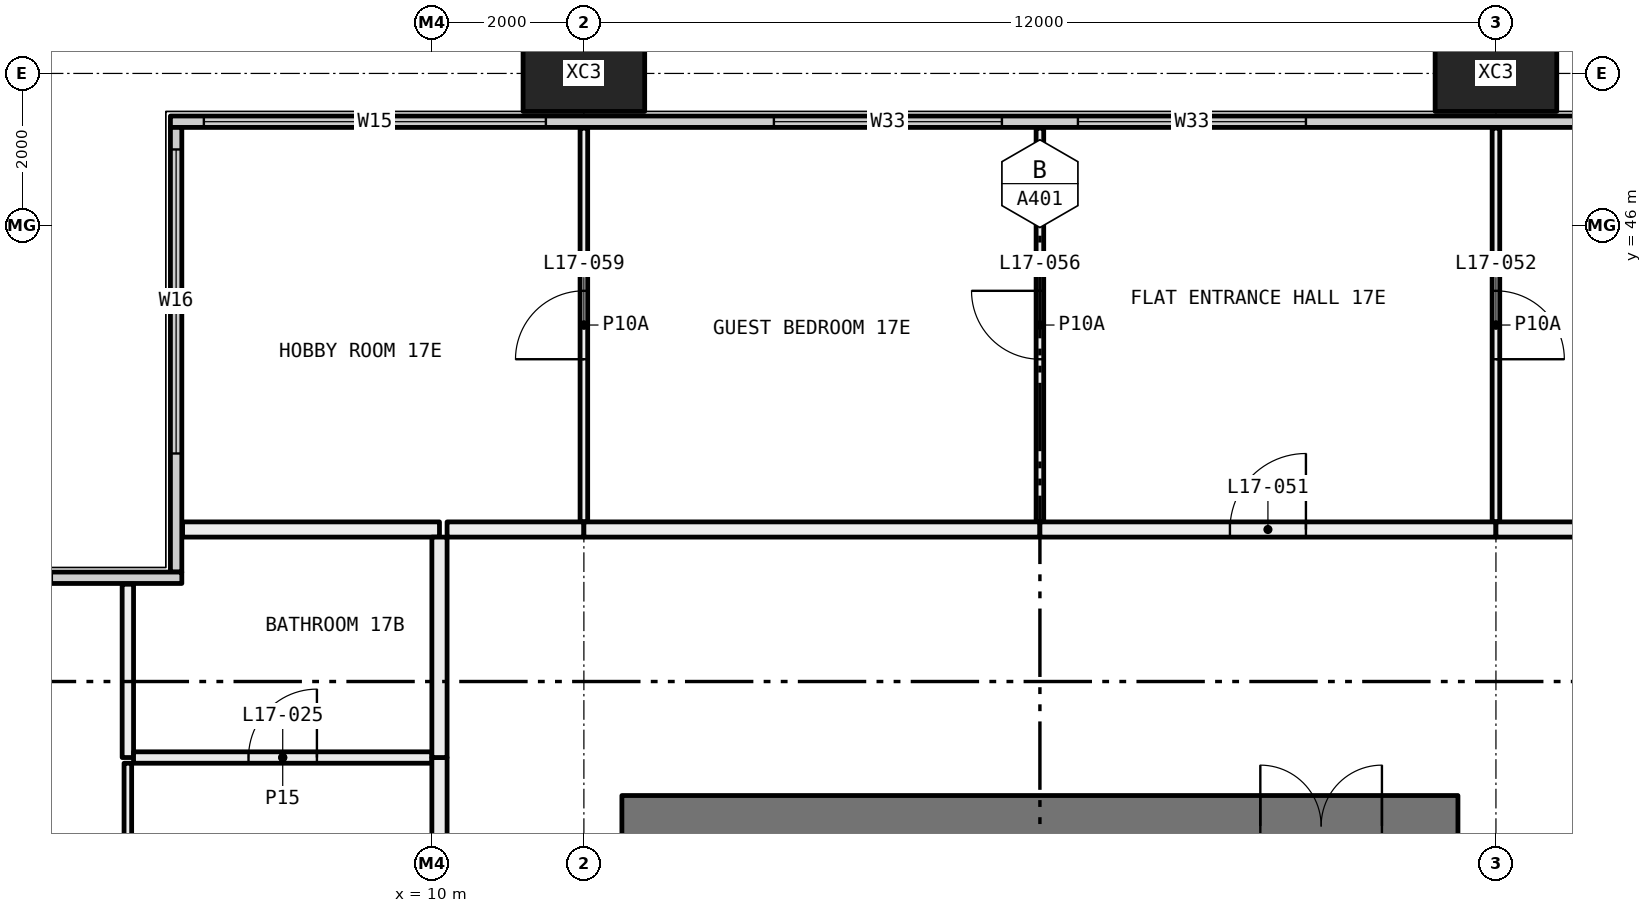
"""IFC4 building model, lengths in metres.
Left out: names, types, materials, properties, quantities, classifications, styles, units other than length and angle.
Written with IfcOpenShell. Run it as: python <this file> out.ifc"""

import sys

from ifc_helpers import new_model, si_unit, direction, frame, frame_2d, origin, origin_2d, place, context, subcontext, project, spatial, rectangle, hollow_rectangle, extrude, element, fill, save


model = new_model("IFC4")
c1 = context("Model", 3, precision=1e-05, world=origin(), true_north=direction((0.0, 1.0)))
c2 = subcontext(c1, "Body", "Model", "MODEL_VIEW")
j1 = project(units=[si_unit("LENGTHUNIT", "METRE"), si_unit("PLANEANGLEUNIT", "RADIAN")], contexts=[c1])
p1 = place(None, origin())
s1 = spatial("IfcSite", under=j1, at=p1, CompositionType="ELEMENT")
p2 = place(p1, origin())
s2 = spatial("IfcBuilding", under=s1, at=p2, CompositionType="ELEMENT")
p3 = place(p2, frame((0.0, 0.0, 71.4)))
s3 = spatial("IfcBuildingStorey", under=s2, at=p3, CompositionType="ELEMENT", Elevation=71.4)
for number, where, z_axis, x_axis in (
    (1, (12.0, 48.0, -0.4), (0.0, 0.0, 1.0), (1.0, 0.0, 0.0)),
    (2, (24.0, 48.0, -0.4), (0.0, 0.0, 1.0), (1.0, 0.0, 0.0)),
):
    element("IfcColumn", number, at=place(p3, frame(where, z_axis=z_axis, x_axis=x_axis)), inside=s3, PredefinedType="COLUMN", context=c2, shape_type="SweptSolid", body=[
        extrude(hollow_rectangle(XDim=1.6, YDim=1.0, WallThickness=0.065, at=origin_2d()), origin(), (0.0, 0.0, 1.0), 3.45),
    ])
p4 = place(p3, frame((6.56, 47.365, 0.0), z_axis=(0.0, 0.0, 1.0), x_axis=(1.0, 0.0, 0.0)))
e3 = element("IfcWall", 3, at=p4, inside=s3, PredefinedType="ELEMENTEDWALL", context=c2, shape_type="SweptSolid", body=[
    extrude(rectangle(XDim=58.88, YDim=0.15, at=frame_2d((29.44, 0.0))), origin(), (0.0, 0.0, 1.0), 3.05),
])
p5 = place(p4, frame((0.44, 0.0, 0.45)))
e4 = element("IfcOpeningElement", 4, at=p5, cuts=e3, PredefinedType="OPENING", context=c2, shape_type="SweptSolid", body=[
    extrude(rectangle(XDim=4.5, YDim=2.55, at=frame_2d((2.25, 1.275))), frame((0.0, 0.085, 0.0), z_axis=(0.0, -1.0, 0.0), x_axis=(1.0, 0.0, 0.0)), (0.0, 0.0, 1.0), 0.17),
])
p6 = place(p4, frame((7.94, 0.0, 0.45)))
e5 = element("IfcOpeningElement", 5, at=p6, cuts=e3, PredefinedType="OPENING", context=c2, shape_type="SweptSolid", body=[
    extrude(rectangle(XDim=3.0, YDim=2.55, at=frame_2d((1.5, 1.275))), frame((0.0, 0.085, 0.0), z_axis=(0.0, -1.0, 0.0), x_axis=(1.0, 0.0, 0.0)), (0.0, 0.0, 1.0), 0.17),
])
p7 = place(p4, frame((11.94, 0.0, 0.45)))
e6 = element("IfcOpeningElement", 6, at=p7, cuts=e3, PredefinedType="OPENING", context=c2, shape_type="SweptSolid", body=[
    extrude(rectangle(XDim=3.0, YDim=2.55, at=frame_2d((1.5, 1.275))), frame((0.0, 0.085, 0.0), z_axis=(0.0, -1.0, 0.0), x_axis=(1.0, 0.0, 0.0)), (0.0, 0.0, 1.0), 0.17),
])
p8 = place(p4, frame((19.94, 0.0, 0.45)))
e7 = element("IfcOpeningElement", 7, at=p8, cuts=e3, PredefinedType="OPENING", context=c2, shape_type="SweptSolid", body=[
    extrude(rectangle(XDim=3.0, YDim=2.55, at=frame_2d((1.5, 1.275))), frame((0.0, 0.085, 0.0), z_axis=(0.0, -1.0, 0.0), x_axis=(1.0, 0.0, 0.0)), (0.0, 0.0, 1.0), 0.17),
])
p9 = place(p4, frame((23.94, 0.0, 0.45)))
e8 = element("IfcOpeningElement", 8, at=p9, cuts=e3, PredefinedType="OPENING", context=c2, shape_type="SweptSolid", body=[
    extrude(rectangle(XDim=2.0, YDim=2.55, at=frame_2d((1.0, 1.275))), frame((0.0, 0.085, 0.0), z_axis=(0.0, -1.0, 0.0), x_axis=(1.0, 0.0, 0.0)), (0.0, 0.0, 1.0), 0.17),
])
p10 = place(p4, frame((31.94, 0.0, 0.45)))
e9 = element("IfcOpeningElement", 9, at=p10, cuts=e3, PredefinedType="OPENING", context=c2, shape_type="SweptSolid", body=[
    extrude(rectangle(XDim=3.0, YDim=2.55, at=frame_2d((1.5, 1.275))), frame((0.0, 0.085, 0.0), z_axis=(0.0, -1.0, 0.0), x_axis=(1.0, 0.0, 0.0)), (0.0, 0.0, 1.0), 0.17),
])
p11 = place(p4, frame((35.94, 0.0, 0.45)))
e10 = element("IfcOpeningElement", 10, at=p11, cuts=e3, PredefinedType="OPENING", context=c2, shape_type="SweptSolid", body=[
    extrude(rectangle(XDim=3.0, YDim=2.55, at=frame_2d((1.5, 1.275))), frame((0.0, 0.085, 0.0), z_axis=(0.0, -1.0, 0.0), x_axis=(1.0, 0.0, 0.0)), (0.0, 0.0, 1.0), 0.17),
])
p12 = place(p4, frame((43.94, 0.0, 0.45)))
e11 = element("IfcOpeningElement", 11, at=p12, cuts=e3, PredefinedType="OPENING", context=c2, shape_type="SweptSolid", body=[
    extrude(rectangle(XDim=3.0, YDim=2.55, at=frame_2d((1.5, 1.275))), frame((0.0, 0.085, 0.0), z_axis=(0.0, -1.0, 0.0), x_axis=(1.0, 0.0, 0.0)), (0.0, 0.0, 1.0), 0.17),
])
p13 = place(p4, frame((47.94, 0.0, 0.45)))
e12 = element("IfcOpeningElement", 12, at=p13, cuts=e3, PredefinedType="OPENING", context=c2, shape_type="SweptSolid", body=[
    extrude(rectangle(XDim=2.0, YDim=2.55, at=frame_2d((1.0, 1.275))), frame((0.0, 0.085, 0.0), z_axis=(0.0, -1.0, 0.0), x_axis=(1.0, 0.0, 0.0)), (0.0, 0.0, 1.0), 0.17),
])
p14 = place(p4, frame((53.94, 0.0, 0.45)))
e13 = element("IfcOpeningElement", 13, at=p14, cuts=e3, PredefinedType="OPENING", context=c2, shape_type="SweptSolid", body=[
    extrude(rectangle(XDim=4.5, YDim=2.55, at=frame_2d((2.25, 1.275))), frame((0.0, 0.085, 0.0), z_axis=(0.0, -1.0, 0.0), x_axis=(1.0, 0.0, 0.0)), (0.0, 0.0, 1.0), 0.17),
])
p15 = place(p3, frame((6.635, 41.44, 0.0), z_axis=(0.0, 0.0, 1.0), x_axis=(0.0, 1.0, 0.0)))
e14 = element("IfcWall", 14, at=p15, inside=s3, PredefinedType="ELEMENTEDWALL", context=c2, shape_type="SweptSolid", body=[
    extrude(rectangle(XDim=5.85, YDim=0.15, at=frame_2d((2.925, 0.0))), origin(), (0.0, 0.0, 1.0), 3.05),
])
p16 = place(p15, frame((1.56, 0.0, 0.45)))
e15 = element("IfcOpeningElement", 15, at=p16, cuts=e14, PredefinedType="OPENING", context=c2, shape_type="SweptSolid", body=[
    extrude(rectangle(XDim=4.0, YDim=2.55, at=frame_2d((2.0, 1.275))), frame((0.0, 0.085, 0.0), z_axis=(0.0, -1.0, 0.0), x_axis=(1.0, 0.0, 0.0)), (0.0, 0.0, 1.0), 0.17),
])
p17 = place(p3, frame((0.56, 41.365, 0.0), z_axis=(0.0, 0.0, 1.0), x_axis=(1.0, 0.0, 0.0)))
e16 = element("IfcWall", 16, at=p17, inside=s3, PredefinedType="ELEMENTEDWALL", context=c2, shape_type="SweptSolid", body=[
    extrude(rectangle(XDim=6.15, YDim=0.15, at=frame_2d((3.075, 0.0))), origin(), (0.0, 0.0, 1.0), 3.05),
])
p18 = place(p17, frame((0.44, 0.0, 0.45)))
e17 = element("IfcOpeningElement", 17, at=p18, cuts=e16, PredefinedType="OPENING", context=c2, shape_type="SweptSolid", body=[
    extrude(rectangle(XDim=4.0, YDim=2.55, at=frame_2d((2.0, 1.275))), frame((0.0, 0.085, 0.0), z_axis=(0.0, -1.0, 0.0), x_axis=(1.0, 0.0, 0.0)), (0.0, 0.0, 1.0), 0.17),
])
p19 = place(p3, frame((6.0, 36.05, 0.0), z_axis=(0.0, 0.0, 1.0), x_axis=(0.0, 1.0, 0.0)))
e18 = element("IfcWall", 18, at=p19, inside=s3, PredefinedType="PARTITIONING", context=c2, shape_type="SweptSolid", body=[
    extrude(rectangle(XDim=2.875, YDim=0.1, at=frame_2d((1.438, 0.0))), origin(), (0.0, 0.0, 1.0), 2.45),
])
p20 = place(p3, frame((6.0, 39.0, 0.0), z_axis=(0.0, 0.0, 1.0), x_axis=(0.0, 1.0, 0.0)))
e19 = element("IfcWall", 19, at=p20, inside=s3, PredefinedType="PARTITIONING", context=c2, shape_type="SweptSolid", body=[
    extrude(rectangle(XDim=2.28, YDim=0.15, at=frame_2d((1.14, 0.0))), origin(), (0.0, 0.0, 1.0), 3.05),
])
p21 = place(p3, frame((10.0, 39.0, 0.0), z_axis=(0.0, 0.0, 1.0), x_axis=(-1.0, 0.0, 0.0)))
e20 = element("IfcWall", 20, at=p21, inside=s3, PredefinedType="PARTITIONING", context=c2, shape_type="SweptSolid", body=[
    extrude(rectangle(XDim=3.925, YDim=0.15, at=frame_2d((1.962, 0.0))), origin(), (0.0, 0.0, 1.0), 3.05),
])
p22 = place(p21, frame((1.512, 0.0, 0.0)))
e21 = element("IfcOpeningElement", 21, at=p22, cuts=e20, PredefinedType="OPENING", context=c2, shape_type="SweptSolid", body=[
    extrude(rectangle(XDim=0.9, YDim=2.1, at=frame_2d((0.45, 1.05))), frame((0.0, 0.085, 0.0), z_axis=(0.0, -1.0, 0.0), x_axis=(1.0, 0.0, 0.0)), (0.0, 0.0, 1.0), 0.17),
])
p23 = place(p3, frame((10.1, 36.1, 0.0), z_axis=(0.0, 0.0, 1.0), x_axis=(0.0, 1.0, 0.0)))
e22 = element("IfcWall", 22, at=p23, inside=s3, PredefinedType="PARTITIONING", context=c2, shape_type="SweptSolid", body=[
    extrude(rectangle(XDim=2.9, YDim=0.2, at=frame_2d((1.45, 0.0))), origin(), (0.0, 0.0, 1.0), 3.05),
])
p24 = place(p3, frame((10.1, 42.0, 0.0), z_axis=(0.0, 0.0, 1.0), x_axis=(-1.0, 0.0, 0.0)))
e23 = element("IfcWall", 23, at=p24, inside=s3, PredefinedType="PARTITIONING", context=c2, shape_type="SweptSolid", body=[
    extrude(rectangle(XDim=3.38, YDim=0.2, at=frame_2d((1.69, 0.0))), origin(), (0.0, 0.0, 1.0), 3.05),
])
p25 = place(p3, frame((10.1, 39.0, 0.0), z_axis=(0.0, 0.0, 1.0), x_axis=(0.0, 1.0, 0.0)))
e24 = element("IfcWall", 24, at=p25, inside=s3, PredefinedType="PARTITIONING", context=c2, shape_type="SweptSolid", body=[
    extrude(rectangle(XDim=2.9, YDim=0.2, at=frame_2d((1.45, 0.0))), origin(), (0.0, 0.0, 1.0), 3.05),
])
p26 = place(p3, frame((12.0, 42.1, 0.0), z_axis=(0.0, 0.0, 1.0), x_axis=(0.0, 1.0, 0.0)))
e25 = element("IfcWall", 25, at=p26, inside=s3, PredefinedType="PARTITIONING", context=c2, shape_type="SweptSolid", body=[
    extrude(rectangle(XDim=5.18, YDim=0.1, at=frame_2d((2.59, 0.0))), origin(), (0.0, 0.0, 1.0), 3.05),
])
p27 = place(p26, frame((2.14, 0.0, 0.0)))
e26 = element("IfcOpeningElement", 26, at=p27, cuts=e25, PredefinedType="OPENING", context=c2, shape_type="SweptSolid", body=[
    extrude(rectangle(XDim=0.9, YDim=2.1, at=frame_2d((0.45, 1.05))), frame((0.0, 0.06, 0.0), z_axis=(0.0, -1.0, 0.0), x_axis=(1.0, 0.0, 0.0)), (0.0, 0.0, 1.0), 0.12),
])
p28 = place(p3, frame((10.2, 42.0, 0.0), z_axis=(0.0, 0.0, 1.0), x_axis=(1.0, 0.0, 0.0)))
e27 = element("IfcWall", 27, at=p28, inside=s3, PredefinedType="PARTITIONING", context=c2, shape_type="SweptSolid", body=[
    extrude(rectangle(XDim=1.8, YDim=0.2, at=frame_2d((0.9, 0.0))), origin(), (0.0, 0.0, 1.0), 3.05),
])
p29 = place(p3, frame((18.0, 42.1, 0.0), z_axis=(0.0, 0.0, 1.0), x_axis=(0.0, 1.0, 0.0)))
e28 = element("IfcWall", 28, at=p29, inside=s3, PredefinedType="PARTITIONING", context=c2, shape_type="SweptSolid", body=[
    extrude(rectangle(XDim=5.18, YDim=0.1, at=frame_2d((2.59, 0.0))), origin(), (0.0, 0.0, 1.0), 3.05),
])
p30 = place(p29, frame((2.14, 0.0, 0.0)))
e29 = element("IfcOpeningElement", 29, at=p30, cuts=e28, PredefinedType="OPENING", context=c2, shape_type="SweptSolid", body=[
    extrude(rectangle(XDim=0.9, YDim=2.1, at=frame_2d((0.45, 1.05))), frame((0.0, 0.06, 0.0), z_axis=(0.0, -1.0, 0.0), x_axis=(1.0, 0.0, 0.0)), (0.0, 0.0, 1.0), 0.12),
])
p31 = place(p3, frame((12.0, 42.0, 0.0), z_axis=(0.0, 0.0, 1.0), x_axis=(1.0, 0.0, 0.0)))
e30 = element("IfcWall", 30, at=p31, inside=s3, PredefinedType="PARTITIONING", context=c2, shape_type="SweptSolid", body=[
    extrude(rectangle(XDim=6.0, YDim=0.2, at=frame_2d((3.0, 0.0))), origin(), (0.0, 0.0, 1.0), 3.05),
])
p32 = place(p3, frame((24.0, 42.1, 0.0), z_axis=(0.0, 0.0, 1.0), x_axis=(0.0, 1.0, 0.0)))
e31 = element("IfcWall", 31, at=p32, inside=s3, PredefinedType="PARTITIONING", context=c2, shape_type="SweptSolid", body=[
    extrude(rectangle(XDim=5.18, YDim=0.1, at=frame_2d((2.59, 0.0))), origin(), (0.0, 0.0, 1.0), 3.05),
])
p33 = place(p32, frame((2.14, 0.0, 0.0)))
e32 = element("IfcOpeningElement", 32, at=p33, cuts=e31, PredefinedType="OPENING", context=c2, shape_type="SweptSolid", body=[
    extrude(rectangle(XDim=0.9, YDim=2.1, at=frame_2d((0.45, 1.05))), frame((0.0, 0.06, 0.0), z_axis=(0.0, -1.0, 0.0), x_axis=(1.0, 0.0, 0.0)), (0.0, 0.0, 1.0), 0.12),
])
p34 = place(p3, frame((18.0, 42.0, 0.0), z_axis=(0.0, 0.0, 1.0), x_axis=(1.0, 0.0, 0.0)))
e33 = element("IfcWall", 33, at=p34, inside=s3, PredefinedType="PARTITIONING", context=c2, shape_type="SweptSolid", body=[
    extrude(rectangle(XDim=6.0, YDim=0.2, at=frame_2d((3.0, 0.0))), origin(), (0.0, 0.0, 1.0), 3.05),
])
p35 = place(p34, frame((2.5, 0.0, 0.0)))
e34 = element("IfcOpeningElement", 34, at=p35, cuts=e33, PredefinedType="OPENING", context=c2, shape_type="SweptSolid", body=[
    extrude(rectangle(XDim=1.0, YDim=2.1, at=frame_2d((0.5, 1.05))), frame((0.0, 0.11, 0.0), z_axis=(0.0, -1.0, 0.0), x_axis=(1.0, 0.0, 0.0)), (0.0, 0.0, 1.0), 0.22),
])
p36 = place(p3, frame((24.0, 42.0, 0.0), z_axis=(0.0, 0.0, 1.0), x_axis=(1.0, 0.0, 0.0)))
e35 = element("IfcWall", 35, at=p36, inside=s3, PredefinedType="PARTITIONING", context=c2, shape_type="SweptSolid", body=[
    extrude(rectangle(XDim=1.9, YDim=0.2, at=frame_2d((0.95, 0.0))), origin(), (0.0, 0.0, 1.0), 3.05),
])
p37 = place(p3, frame((12.5, 38.1, 0.0), z_axis=(0.0, 0.0, 1.0), x_axis=(1.0, 0.0, 0.0)))
e36 = element("IfcWall", 36, at=p37, inside=s3, PredefinedType="SHEAR", context=c2, shape_type="SweptSolid", body=[
    extrude(rectangle(XDim=11.0, YDim=0.8, at=frame_2d((5.5, 0.0))), origin(), (0.0, 0.0, 1.0), 3.05),
])
p38 = place(p37, frame((8.4, 0.0, 0.0)))
e37 = element("IfcOpeningElement", 37, at=p38, cuts=e36, PredefinedType="OPENING", context=c2, shape_type="SweptSolid", body=[
    extrude(rectangle(XDim=1.6, YDim=2.1, at=frame_2d((0.8, 1.05))), frame((0.0, 0.41, 0.0), z_axis=(0.0, -1.0, 0.0), x_axis=(1.0, 0.0, 0.0)), (0.0, 0.0, 1.0), 0.82),
])
p39 = place(p5, origin())
e38 = element("IfcWindow", 38, at=p39, inside=s3, PartitioningType="SINGLE_PANEL", PredefinedType="WINDOW", context=c2, shape_type="SweptSolid", body=[
    extrude(rectangle(XDim=4.5, YDim=2.55, at=frame_2d((2.25, 1.275))), frame((0.0, 0.03, 0.0), z_axis=(0.0, -1.0, 0.0), x_axis=(1.0, 0.0, 0.0)), (0.0, 0.0, 1.0), 0.06),
])
fill(e4, e38)
p40 = place(p6, origin())
e39 = element("IfcWindow", 39, at=p40, inside=s3, PartitioningType="SINGLE_PANEL", PredefinedType="WINDOW", context=c2, shape_type="SweptSolid", body=[
    extrude(rectangle(XDim=3.0, YDim=2.55, at=frame_2d((1.5, 1.275))), frame((0.0, 0.03, 0.0), z_axis=(0.0, -1.0, 0.0), x_axis=(1.0, 0.0, 0.0)), (0.0, 0.0, 1.0), 0.06),
])
fill(e5, e39)
p41 = place(p7, origin())
e40 = element("IfcWindow", 40, at=p41, inside=s3, PartitioningType="SINGLE_PANEL", PredefinedType="WINDOW", context=c2, shape_type="SweptSolid", body=[
    extrude(rectangle(XDim=3.0, YDim=2.55, at=frame_2d((1.5, 1.275))), frame((0.0, 0.03, 0.0), z_axis=(0.0, -1.0, 0.0), x_axis=(1.0, 0.0, 0.0)), (0.0, 0.0, 1.0), 0.06),
])
fill(e6, e40)
p42 = place(p16, origin())
e41 = element("IfcWindow", 41, at=p42, inside=s3, PartitioningType="SINGLE_PANEL", PredefinedType="WINDOW", context=c2, shape_type="SweptSolid", body=[
    extrude(rectangle(XDim=4.0, YDim=2.55, at=frame_2d((2.0, 1.275))), frame((0.0, 0.03, 0.0), z_axis=(0.0, -1.0, 0.0), x_axis=(1.0, 0.0, 0.0)), (0.0, 0.0, 1.0), 0.06),
])
fill(e15, e41)
p43 = place(p22, frame((0.9, 0.0, 0.0), x_axis=(-1.0, 0.0, 0.0)))
e42 = element("IfcDoor", 42, at=p43, inside=s3, OperationType="SINGLE_SWING_LEFT", PredefinedType="DOOR", context=c2, shape_type="SweptSolid", body=[
    extrude(rectangle(XDim=0.9, YDim=2.1, at=frame_2d((0.45, 1.05))), frame((0.0, 0.025, 0.0), z_axis=(0.0, -1.0, 0.0), x_axis=(1.0, 0.0, 0.0)), (0.0, 0.0, 1.0), 0.05),
])
fill(e21, e42)
p44 = place(p35, origin())
e43 = element("IfcDoor", 43, at=p44, inside=s3, OperationType="SINGLE_SWING_LEFT", PredefinedType="DOOR", context=c2, shape_type="SweptSolid", body=[
    extrude(rectangle(XDim=1.0, YDim=2.1, at=frame_2d((0.5, 1.05))), frame((0.0, 0.025, 0.0), z_axis=(0.0, -1.0, 0.0), x_axis=(1.0, 0.0, 0.0)), (0.0, 0.0, 1.0), 0.05),
])
fill(e34, e43)
p45 = place(p33, frame((0.9, 0.0, 0.0), x_axis=(-1.0, 0.0, 0.0)))
e44 = element("IfcDoor", 44, at=p45, inside=s3, OperationType="SINGLE_SWING_LEFT", PredefinedType="DOOR", context=c2, shape_type="SweptSolid", body=[
    extrude(rectangle(XDim=0.9, YDim=2.1, at=frame_2d((0.45, 1.05))), frame((0.0, 0.025, 0.0), z_axis=(0.0, -1.0, 0.0), x_axis=(1.0, 0.0, 0.0)), (0.0, 0.0, 1.0), 0.05),
])
fill(e32, e44)
p46 = place(p30, origin())
e45 = element("IfcDoor", 45, at=p46, inside=s3, OperationType="SINGLE_SWING_LEFT", PredefinedType="DOOR", context=c2, shape_type="SweptSolid", body=[
    extrude(rectangle(XDim=0.9, YDim=2.1, at=frame_2d((0.45, 1.05))), frame((0.0, 0.025, 0.0), z_axis=(0.0, -1.0, 0.0), x_axis=(1.0, 0.0, 0.0)), (0.0, 0.0, 1.0), 0.05),
])
fill(e29, e45)
p47 = place(p27, origin())
e46 = element("IfcDoor", 46, at=p47, inside=s3, OperationType="SINGLE_SWING_RIGHT", PredefinedType="DOOR", context=c2, shape_type="SweptSolid", body=[
    extrude(rectangle(XDim=0.9, YDim=2.1, at=frame_2d((0.45, 1.05))), frame((0.0, 0.025, 0.0), z_axis=(0.0, -1.0, 0.0), x_axis=(1.0, 0.0, 0.0)), (0.0, 0.0, 1.0), 0.05),
])
fill(e26, e46)
p48 = place(p38, origin())
e47 = element("IfcDoor", 47, at=p48, inside=s3, OperationType="DOUBLE_DOOR_SINGLE_SWING", PredefinedType="DOOR", context=c2, shape_type="SweptSolid", body=[
    extrude(rectangle(XDim=1.6, YDim=2.1, at=frame_2d((0.8, 1.05))), frame((0.0, 0.025, 0.0), z_axis=(0.0, -1.0, 0.0), x_axis=(1.0, 0.0, 0.0)), (0.0, 0.0, 1.0), 0.05),
])
fill(e37, e47)
save(model, sys.argv[1])
